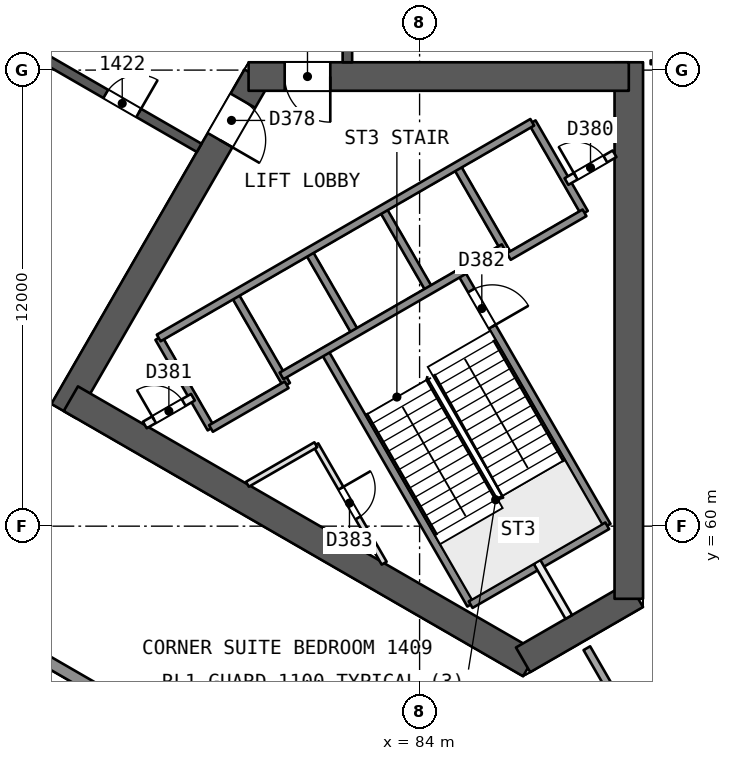
"""IFC4 building model, lengths in metres.
Left out: names, types, materials, properties, quantities, classifications, styles, units other than length and angle.
Written with IfcOpenShell. Run it as: python <this file> out.ifc"""

import sys

from ifc_helpers import new_model, si_unit, direction, frame, frame_2d, origin, place, context, subcontext, project, spatial, rectangle, extrude, element, fill, save


model = new_model("IFC4")
c1 = context("Model", 3, precision=1e-05, world=origin(), true_north=direction((0.0, 1.0)))
c2 = subcontext(c1, "Body", "Model", "MODEL_VIEW")
j1 = project(units=[si_unit("LENGTHUNIT", "METRE"), si_unit("PLANEANGLEUNIT", "RADIAN")], contexts=[c1])
p1 = place(None, origin())
s1 = spatial("IfcSite", under=j1, at=p1, CompositionType="ELEMENT")
p2 = place(p1, origin())
s2 = spatial("IfcBuilding", under=s1, at=p2, CompositionType="ELEMENT")
p3 = place(p2, frame((0.0, 0.0, 64.7)))
s3 = spatial("IfcBuildingStorey", under=s2, at=p3, CompositionType="ELEMENT", Elevation=64.7)
p4 = place(p3, frame((79.717, 71.831, 0.0), z_axis=(0.0, 0.0, 1.0), x_axis=(-0.499996230114, -0.866027580318, 0.0)))
e1 = element("IfcWall", 1, at=p4, inside=s3, PredefinedType="SHEAR", context=c2, shape_type="SweptSolid", body=[
    extrude(rectangle(XDim=10.164, YDim=0.75, at=frame_2d((5.082, 0.0))), origin(), (0.0, 0.0, 1.0), 3.7),
])
p5 = place(p4, frame((0.733, 0.0, 0.0)))
e2 = element("IfcOpeningElement", 2, at=p5, cuts=e1, PredefinedType="OPENING", context=c2, shape_type="SweptSolid", body=[
    extrude(rectangle(XDim=1.2, YDim=2.1, at=frame_2d((0.6, 1.05))), frame((0.0, 0.385, 0.0), z_axis=(0.0, -1.0, 0.0), x_axis=(1.0, 0.0, 0.0)), (0.0, 0.0, 1.0), 0.771),
])
p6 = place(p3, frame((74.822, 63.354, 0.0), z_axis=(0.0, 0.0, 1.0), x_axis=(0.8660248072, -0.500001033313, 0.0)))
e3 = element("IfcWall", 3, at=p6, inside=s3, PredefinedType="SHEAR", context=c2, shape_type="SweptSolid", body=[
    extrude(rectangle(XDim=13.958, YDim=0.75, at=frame_2d((6.979, 0.0))), origin(), (0.0, 0.0, 1.0), 3.7),
])
p7 = place(p3, frame((86.723, 56.483, 0.0), z_axis=(0.0, 0.0, 1.0), x_axis=(0.866017201164, 0.500014207086, 0.0)))
e4 = element("IfcWall", 4, at=p7, inside=s3, PredefinedType="SHEAR", context=c2, shape_type="SweptSolid", body=[
    extrude(rectangle(XDim=3.429, YDim=0.75, at=frame_2d((1.714, 0.0))), origin(), (0.0, 0.0, 1.0), 3.7),
])
p8 = place(p3, frame((89.505, 58.089, 0.0), z_axis=(0.0, 0.0, 1.0), x_axis=(0.0, 1.0, 0.0)))
e5 = element("IfcWall", 5, at=p8, inside=s3, PredefinedType="SHEAR", context=c2, shape_type="SweptSolid", body=[
    extrude(rectangle(XDim=14.117, YDim=0.75, at=frame_2d((7.059, 0.0))), origin(), (0.0, 0.0, 1.0), 3.7),
])
p9 = place(p3, frame((89.505, 71.831, 0.0), z_axis=(0.0, 0.0, 1.0), x_axis=(-1.0, 0.0, 0.0)))
e6 = element("IfcWall", 6, at=p9, inside=s3, PredefinedType="SHEAR", context=c2, shape_type="SweptSolid", body=[
    extrude(rectangle(XDim=10.005, YDim=0.75, at=frame_2d((5.002, 0.0))), origin(), (0.0, 0.0, 1.0), 3.7),
])
p10 = place(p9, frame((7.855, 0.0, 0.0)))
e7 = element("IfcOpeningElement", 7, at=p10, cuts=e6, PredefinedType="OPENING", context=c2, shape_type="SweptSolid", body=[
    extrude(rectangle(XDim=1.2, YDim=2.1, at=frame_2d((0.6, 1.05))), frame((0.0, 0.385, 0.0), z_axis=(0.0, -1.0, 0.0), x_axis=(1.0, 0.0, 0.0)), (0.0, 0.0, 1.0), 0.771),
])
p11 = place(p3, frame((82.1, 72.206, 0.0), z_axis=(0.0, 0.0, 1.0), x_axis=(0.0, 1.0, 0.0)))
e8 = element("IfcWall", 8, at=p11, inside=s3, PredefinedType="SHEAR", context=c2, shape_type="SweptSolid", body=[
    extrude(rectangle(XDim=15.588, YDim=0.25, at=frame_2d((7.794, 0.0))), origin(), (0.0, 0.0, 1.0), 3.2),
])
p12 = place(p11, frame((1.838, 0.0, 0.0)))
e9 = element("IfcOpeningElement", 9, at=p12, cuts=e8, PredefinedType="OPENING", context=c2, shape_type="SweptSolid", body=[
    extrude(rectangle(XDim=1.0, YDim=2.1, at=frame_2d((0.5, 1.05))), frame((0.0, 0.135, 0.0), z_axis=(0.0, -1.0, 0.0), x_axis=(1.0, 0.0, 0.0)), (0.0, 0.0, 1.0), 0.271),
])
p13 = place(p11, frame((9.006, 0.0, 0.0)))
e10 = element("IfcOpeningElement", 10, at=p13, cuts=e8, PredefinedType="OPENING", context=c2, shape_type="SweptSolid", body=[
    extrude(rectangle(XDim=1.1, YDim=2.1, at=frame_2d((0.55, 1.05))), frame((0.0, 0.135, 0.0), z_axis=(0.0, -1.0, 0.0), x_axis=(1.0, 0.0, 0.0)), (0.0, 0.0, 1.0), 0.271),
])
p14 = place(p11, frame((13.062, 0.0, 0.0)))
e11 = element("IfcOpeningElement", 11, at=p14, cuts=e8, PredefinedType="OPENING", context=c2, shape_type="SweptSolid", body=[
    extrude(rectangle(XDim=1.0, YDim=2.1, at=frame_2d((0.5, 1.05))), frame((0.0, 0.135, 0.0), z_axis=(0.0, -1.0, 0.0), x_axis=(1.0, 0.0, 0.0)), (0.0, 0.0, 1.0), 0.271),
])
p15 = place(p3, frame((64.7, 77.748, 0.0), z_axis=(0.0, 0.0, 1.0), x_axis=(0.866026492143, -0.499998114903, 0.0)))
e12 = element("IfcWall", 12, at=p15, inside=s3, PredefinedType="SHEAR", context=c2, shape_type="SweptSolid", body=[
    extrude(rectangle(XDim=15.588, YDim=0.25, at=frame_2d((7.794, 0.0))), origin(), (0.0, 0.0, 1.0), 3.2),
])
p16 = place(p15, frame((1.838, 0.0, 0.0)))
e13 = element("IfcOpeningElement", 13, at=p16, cuts=e12, PredefinedType="OPENING", context=c2, shape_type="SweptSolid", body=[
    extrude(rectangle(XDim=1.0, YDim=2.1, at=frame_2d((0.5, 1.05))), frame((0.0, 0.135, 0.0), z_axis=(0.0, -1.0, 0.0), x_axis=(1.0, 0.0, 0.0)), (0.0, 0.0, 1.0), 0.271),
])
p17 = place(p15, frame((8.694, 0.0, 0.0)))
e14 = element("IfcOpeningElement", 14, at=p17, cuts=e12, PredefinedType="OPENING", context=c2, shape_type="SweptSolid", body=[
    extrude(rectangle(XDim=1.1, YDim=2.1, at=frame_2d((0.55, 1.05))), frame((0.0, 0.135, 0.0), z_axis=(0.0, -1.0, 0.0), x_axis=(1.0, 0.0, 0.0)), (0.0, 0.0, 1.0), 0.271),
])
p18 = place(p15, frame((12.75, 0.0, 0.0)))
e15 = element("IfcOpeningElement", 15, at=p18, cuts=e12, PredefinedType="OPENING", context=c2, shape_type="SweptSolid", body=[
    extrude(rectangle(XDim=1.0, YDim=2.1, at=frame_2d((0.5, 1.05))), frame((0.0, 0.135, 0.0), z_axis=(0.0, -1.0, 0.0), x_axis=(1.0, 0.0, 0.0)), (0.0, 0.0, 1.0), 0.271),
])
p19 = place(p3, frame((90.079, 72.206, 0.0), z_axis=(0.0, 0.0, 1.0), x_axis=(1.0, 0.0, 0.0)))
e16 = element("IfcWall", 16, at=p19, inside=s3, PredefinedType="PARTITIONING", context=c2, shape_type="SweptSolid", body=[
    extrude(rectangle(XDim=5.571, YDim=0.1, at=frame_2d((2.786, 0.0))), origin(), (0.0, 0.0, 1.0), 3.2),
])
p20 = place(p19, frame((2.336, 0.0, 0.0)))
e17 = element("IfcOpeningElement", 17, at=p20, cuts=e16, PredefinedType="OPENING", context=c2, shape_type="SweptSolid", body=[
    extrude(rectangle(XDim=0.9, YDim=2.1, at=frame_2d((0.45, 1.05))), frame((0.0, 0.061, 0.0), z_axis=(0.0, -1.0, 0.0), x_axis=(1.0, 0.0, 0.0)), (0.0, 0.0, 1.0), 0.121),
])
p21 = place(p3, frame((88.401, 56.789, 0.0), z_axis=(0.0, 0.0, 1.0), x_axis=(0.49998471623, -0.866034227694, 0.0)))
e18 = element("IfcWall", 18, at=p21, inside=s3, PredefinedType="PARTITIONING", context=c2, shape_type="SweptSolid", body=[
    extrude(rectangle(XDim=9.347, YDim=0.2, at=frame_2d((4.674, 0.0))), origin(), (0.0, 0.0, 1.0), 3.2),
])
p22 = place(p3, frame((90.499, 47.034, 0.0), z_axis=(0.0, 0.0, 1.0), x_axis=(-0.866026049211, 0.499998882086, 0.0)))
e19 = element("IfcWall", 19, at=p22, inside=s3, PredefinedType="SOLIDWALL", context=c2, shape_type="SweptSolid", body=[
    extrude(rectangle(XDim=59.811, YDim=0.3, at=frame_2d((29.905, 0.0))), origin(), (0.0, 0.0, 1.0), 3.2),
])
p23 = place(p22, frame((28.705, 0.0, 0.0)))
e20 = element("IfcOpeningElement", 20, at=p23, cuts=e19, PredefinedType="OPENING", context=c2, shape_type="SweptSolid", body=[
    extrude(rectangle(XDim=2.4, YDim=2.4, at=frame_2d((1.2, 1.2))), frame((0.0, 0.161, 0.0), z_axis=(0.0, -1.0, 0.0), x_axis=(1.0, 0.0, 0.0)), (0.0, 0.0, 1.0), 0.321),
])
p24 = place(p22, frame((34.161, 0.0, 0.0)))
e21 = element("IfcOpeningElement", 21, at=p24, cuts=e19, PredefinedType="OPENING", context=c2, shape_type="SweptSolid", body=[
    extrude(rectangle(XDim=2.4, YDim=2.4, at=frame_2d((1.2, 1.2))), frame((0.0, 0.161, 0.0), z_axis=(0.0, -1.0, 0.0), x_axis=(1.0, 0.0, 0.0)), (0.0, 0.0, 1.0), 0.321),
])
p25 = place(p22, frame((46.394, 0.0, 0.0)))
e22 = element("IfcOpeningElement", 22, at=p25, cuts=e19, PredefinedType="OPENING", context=c2, shape_type="SweptSolid", body=[
    extrude(rectangle(XDim=2.4, YDim=2.4, at=frame_2d((1.2, 1.2))), frame((0.0, 0.161, 0.0), z_axis=(0.0, -1.0, 0.0), x_axis=(1.0, 0.0, 0.0)), (0.0, 0.0, 1.0), 0.321),
])
p26 = place(p22, frame((23.249, 0.0, 0.0)))
e23 = element("IfcOpeningElement", 23, at=p26, cuts=e19, PredefinedType="OPENING", context=c2, shape_type="SweptSolid", body=[
    extrude(rectangle(XDim=2.4, YDim=2.4, at=frame_2d((1.2, 1.2))), frame((0.0, 0.161, 0.0), z_axis=(0.0, -1.0, 0.0), x_axis=(1.0, 0.0, 0.0)), (0.0, 0.0, 1.0), 0.321),
])
p27 = place(p22, frame((11.002, 0.0, 0.0)))
e24 = element("IfcOpeningElement", 24, at=p27, cuts=e19, PredefinedType="OPENING", context=c2, shape_type="SweptSolid", body=[
    extrude(rectangle(XDim=2.4, YDim=2.4, at=frame_2d((1.2, 1.2))), frame((0.0, 0.161, 0.0), z_axis=(0.0, -1.0, 0.0), x_axis=(1.0, 0.0, 0.0)), (0.0, 0.0, 1.0), 0.321),
])
p28 = place(p3, frame((77.135, 64.952, 0.0), z_axis=(0.0, 0.0, 1.0), x_axis=(0.499996545922, -0.866027397988, 0.0)))
e25 = element("IfcWall", 25, at=p28, inside=s3, PredefinedType="SOLIDWALL", context=c2, shape_type="SweptSolid", body=[
    extrude(rectangle(XDim=2.75, YDim=0.2, at=frame_2d((1.375, 0.0))), origin(), (0.0, 0.0, 1.0), 3.2),
])
p29 = place(p3, frame((81.269, 62.142, 0.0), z_axis=(0.0, 0.0, 1.0), x_axis=(0.500043557135, -0.866000254601, 0.0)))
e26 = element("IfcWall", 26, at=p29, inside=s3, PredefinedType="PARTITIONING", context=c2, shape_type="SweptSolid", body=[
    extrude(rectangle(XDim=3.598, YDim=0.15, at=frame_2d((1.799, 0.0))), origin(), (0.0, 0.0, 1.0), 3.2),
])
p30 = place(p29, frame((1.322, 0.0, 0.0)))
e27 = element("IfcOpeningElement", 27, at=p30, cuts=e26, PredefinedType="OPENING", context=c2, shape_type="SweptSolid", body=[
    extrude(rectangle(XDim=0.9, YDim=2.1, at=frame_2d((0.45, 1.05))), frame((0.0, 0.085, 0.0), z_axis=(0.0, -1.0, 0.0), x_axis=(1.0, 0.0, 0.0)), (0.0, 0.0, 1.0), 0.171),
])
p31 = place(p3, frame((79.127, 66.102, 0.0), z_axis=(0.0, 0.0, 1.0), x_axis=(0.499996545922, -0.866027397988, 0.0)))
e28 = element("IfcWall", 28, at=p31, inside=s3, PredefinedType="SOLIDWALL", context=c2, shape_type="SweptSolid", body=[
    extrude(rectangle(XDim=2.75, YDim=0.2, at=frame_2d((1.375, 0.0))), origin(), (0.0, 0.0, 1.0), 3.2),
])
p32 = place(p3, frame((81.493, 64.604, 0.0), z_axis=(0.0, 0.0, 1.0), x_axis=(0.500006057782, -0.866021906294, 0.0)))
e29 = element("IfcWall", 29, at=p32, inside=s3, PredefinedType="SOLIDWALL", context=c2, shape_type="SweptSolid", body=[
    extrude(rectangle(XDim=7.7, YDim=0.2, at=frame_2d((3.85, 0.0))), origin(), (0.0, 0.0, 1.0), 3.2),
])
p33 = place(p3, frame((81.076, 67.227, 0.0), z_axis=(0.0, 0.0, 1.0), x_axis=(0.50000366821, -0.866023285932, 0.0)))
e30 = element("IfcWall", 30, at=p33, inside=s3, PredefinedType="SOLIDWALL", context=c2, shape_type="SweptSolid", body=[
    extrude(rectangle(XDim=2.48, YDim=0.2, at=frame_2d((1.24, 0.0))), origin(), (0.0, 0.0, 1.0), 3.2),
])
p34 = place(p3, frame((87.09, 59.06, 0.0), z_axis=(0.0, 0.0, 1.0), x_axis=(0.499937194881, -0.866061661301, 0.0)))
e31 = element("IfcWall", 31, at=p34, inside=s3, PredefinedType="PARTITIONING", context=c2, shape_type="SweptSolid", body=[
    extrude(rectangle(XDim=1.673, YDim=0.2, at=frame_2d((0.836, 0.0))), origin(), (0.0, 0.0, 1.0), 3.2),
])
p35 = place(p3, frame((83.024, 68.352, 0.0), z_axis=(0.0, 0.0, 1.0), x_axis=(0.50000366821, -0.866023285932, 0.0)))
e32 = element("IfcWall", 32, at=p35, inside=s3, PredefinedType="SOLIDWALL", context=c2, shape_type="SweptSolid", body=[
    extrude(rectangle(XDim=2.48, YDim=0.2, at=frame_2d((1.24, 0.0))), origin(), (0.0, 0.0, 1.0), 3.2),
])
p36 = place(p3, frame((85.087, 66.679, 0.0), z_axis=(0.0, 0.0, 1.0), x_axis=(0.500019787375, -0.866013979237, 0.0)))
e33 = element("IfcWall", 33, at=p36, inside=s3, PredefinedType="SOLIDWALL", context=c2, shape_type="SweptSolid", body=[
    extrude(rectangle(XDim=7.7, YDim=0.2, at=frame_2d((3.85, 0.0))), origin(), (0.0, 0.0, 1.0), 3.2),
])
p37 = place(p36, frame((0.55, 0.0, 0.0)))
e34 = element("IfcOpeningElement", 34, at=p37, cuts=e33, PredefinedType="OPENING", context=c2, shape_type="SweptSolid", body=[
    extrude(rectangle(XDim=1.1, YDim=2.1, at=frame_2d((0.55, 1.05))), frame((0.0, 0.11, 0.0), z_axis=(0.0, -1.0, 0.0), x_axis=(1.0, 0.0, 0.0)), (0.0, 0.0, 1.0), 0.221),
])
for number, where, z_axis, x_axis in (
    (35, (84.973, 69.477, 0.0), (0.0, 0.0, 1.0), (0.5, -0.866, 0.0)),
    (36, (86.965, 70.626, 0.0), (0.0, 0.0, 1.0), (0.5, -0.866, 0.0)),
):
    element("IfcWall", number, at=place(p3, frame(where, z_axis=z_axis, x_axis=x_axis)), inside=s3, PredefinedType="SOLIDWALL", context=c2, shape_type="SweptSolid", body=[
        extrude(rectangle(XDim=2.75, YDim=0.2, at=frame_2d((1.375, 0.0))), origin(), (0.0, 0.0, 1.0), 3.2),
    ])
p38 = place(p3, frame((77.135, 64.952, 0.0), z_axis=(0.0, 0.0, 1.0), x_axis=(0.866031916153, 0.499988720078, 0.0)))
e37 = element("IfcWall", 37, at=p38, inside=s3, PredefinedType="SOLIDWALL", context=c2, shape_type="SweptSolid", body=[
    extrude(rectangle(XDim=11.35, YDim=0.2, at=frame_2d((5.675, 0.0))), origin(), (0.0, 0.0, 1.0), 3.2),
])
p39 = place(p3, frame((76.77, 62.662, 0.0), z_axis=(0.0, 0.0, 1.0), x_axis=(0.866054810376, 0.49994906283, 0.0)))
e38 = element("IfcWall", 38, at=p39, inside=s3, PredefinedType="PARTITIONING", context=c2, shape_type="SweptSolid", body=[
    extrude(rectangle(XDim=1.461, YDim=0.2, at=frame_2d((0.73, 0.0))), origin(), (0.0, 0.0, 1.0), 3.2),
])
p40 = place(p39, frame((0.281, 0.0, 0.0)))
e39 = element("IfcOpeningElement", 39, at=p40, cuts=e38, PredefinedType="OPENING", context=c2, shape_type="SweptSolid", body=[
    extrude(rectangle(XDim=0.9, YDim=2.1, at=frame_2d((0.45, 1.05))), frame((0.0, 0.11, 0.0), z_axis=(0.0, -1.0, 0.0), x_axis=(1.0, 0.0, 0.0)), (0.0, 0.0, 1.0), 0.221),
])
p41 = place(p3, frame((87.865, 69.068, 0.0), z_axis=(0.0, 0.0, 1.0), x_axis=(0.865982457891, 0.500074377092, 0.0)))
e40 = element("IfcWall", 40, at=p41, inside=s3, PredefinedType="PARTITIONING", context=c2, shape_type="SweptSolid", body=[
    extrude(rectangle(XDim=1.461, YDim=0.2, at=frame_2d((0.73, 0.0))), origin(), (0.0, 0.0, 1.0), 3.2),
])
p42 = place(p41, frame((0.281, 0.0, 0.0)))
e41 = element("IfcOpeningElement", 41, at=p42, cuts=e40, PredefinedType="OPENING", context=c2, shape_type="SweptSolid", body=[
    extrude(rectangle(XDim=0.9, YDim=2.1, at=frame_2d((0.45, 1.05))), frame((0.0, 0.11, 0.0), z_axis=(0.0, -1.0, 0.0), x_axis=(1.0, 0.0, 0.0)), (0.0, 0.0, 1.0), 0.221),
])
p43 = place(p3, frame((80.367, 63.954, 0.0), z_axis=(0.0, 0.0, 1.0), x_axis=(0.866026575979, 0.499997969693, 0.0)))
e42 = element("IfcWall", 42, at=p43, inside=s3, PredefinedType="SOLIDWALL", context=c2, shape_type="SweptSolid", body=[
    extrude(rectangle(XDim=6.75, YDim=0.2, at=frame_2d((3.375, 0.0))), origin(), (0.0, 0.0, 1.0), 3.2),
])
p44 = place(p3, frame((78.51, 62.57, 0.0), z_axis=(0.0, 0.0, 1.0), x_axis=(0.866053019151, 0.499952165731, 0.0)))
e43 = element("IfcWall", 43, at=p44, inside=s3, PredefinedType="SOLIDWALL", context=c2, shape_type="SweptSolid", body=[
    extrude(rectangle(XDim=2.3, YDim=0.2, at=frame_2d((1.15, 0.0))), origin(), (0.0, 0.0, 1.0), 3.2),
])
p45 = place(p3, frame((86.348, 67.095, 0.0), z_axis=(0.0, 0.0, 1.0), x_axis=(0.86602648383, 0.499998129301, 0.0)))
e44 = element("IfcWall", 44, at=p45, inside=s3, PredefinedType="SOLIDWALL", context=c2, shape_type="SweptSolid", body=[
    extrude(rectangle(XDim=2.3, YDim=0.2, at=frame_2d((1.15, 0.0))), origin(), (0.0, 0.0, 1.0), 3.2),
])
p46 = place(p3, frame((79.47, 61.103, 0.0), z_axis=(0.0, 0.0, 1.0), x_axis=(0.866021168401, 0.500007335828, 0.0)))
e45 = element("IfcWall", 45, at=p46, inside=s3, PredefinedType="PARTITIONING", context=c2, shape_type="SweptSolid", body=[
    extrude(rectangle(XDim=2.077, YDim=0.15, at=frame_2d((1.039, 0.0))), origin(), (0.0, 0.0, 1.0), 3.2),
])
p47 = place(p3, frame((85.343, 57.935, 0.0), z_axis=(0.0, 0.0, 1.0), x_axis=(0.866004344652, 0.500036473714, 0.0)))
e46 = element("IfcWall", 46, at=p47, inside=s3, PredefinedType="SOLIDWALL", context=c2, shape_type="SweptSolid", body=[
    extrude(rectangle(XDim=4.15, YDim=0.2, at=frame_2d((2.075, 0.0))), origin(), (0.0, 0.0, 1.0), 3.2),
])
p48 = place(p18, origin())
e47 = element("IfcDoor", 47, at=p48, inside=s3, OperationType="SINGLE_SWING_RIGHT", PredefinedType="NOTDEFINED", context=c2, shape_type="SweptSolid", body=[
    extrude(rectangle(XDim=1.0, YDim=2.1, at=frame_2d((0.5, 1.05))), frame((0.0, 0.025, 0.0), z_axis=(0.0, -1.0, 0.0), x_axis=(1.0, 0.0, 0.0)), (0.0, 0.0, 1.0), 0.05),
])
fill(e15, e47)
p49 = place(p5, origin())
e48 = element("IfcDoor", 48, at=p49, inside=s3, OperationType="SINGLE_SWING_RIGHT", PredefinedType="NOTDEFINED", context=c2, shape_type="SweptSolid", body=[
    extrude(rectangle(XDim=1.2, YDim=2.1, at=frame_2d((0.6, 1.05))), frame((0.0, 0.025, 0.0), z_axis=(0.0, -1.0, 0.0), x_axis=(1.0, 0.0, 0.0)), (0.0, 0.0, 1.0), 0.05),
])
fill(e2, e48)
p50 = place(p10, origin())
e49 = element("IfcDoor", 49, at=p50, inside=s3, OperationType="SINGLE_SWING_LEFT", PredefinedType="NOTDEFINED", context=c2, shape_type="SweptSolid", body=[
    extrude(rectangle(XDim=1.2, YDim=2.1, at=frame_2d((0.6, 1.05))), frame((0.0, 0.025, 0.0), z_axis=(0.0, -1.0, 0.0), x_axis=(1.0, 0.0, 0.0)), (0.0, 0.0, 1.0), 0.05),
])
fill(e7, e49)
p51 = place(p42, origin())
e50 = element("IfcDoor", 50, at=p51, inside=s3, OperationType="SINGLE_SWING_LEFT", PredefinedType="NOTDEFINED", context=c2, shape_type="SweptSolid", body=[
    extrude(rectangle(XDim=0.9, YDim=2.1, at=frame_2d((0.45, 1.05))), frame((0.0, 0.025, 0.0), z_axis=(0.0, -1.0, 0.0), x_axis=(1.0, 0.0, 0.0)), (0.0, 0.0, 1.0), 0.05),
])
fill(e41, e50)
p52 = place(p40, origin())
e51 = element("IfcDoor", 51, at=p52, inside=s3, OperationType="SINGLE_SWING_LEFT", PredefinedType="NOTDEFINED", context=c2, shape_type="SweptSolid", body=[
    extrude(rectangle(XDim=0.9, YDim=2.1, at=frame_2d((0.45, 1.05))), frame((0.0, 0.025, 0.0), z_axis=(0.0, -1.0, 0.0), x_axis=(1.0, 0.0, 0.0)), (0.0, 0.0, 1.0), 0.05),
])
fill(e39, e51)
p53 = place(p37, origin())
e52 = element("IfcDoor", 52, at=p53, inside=s3, OperationType="SINGLE_SWING_RIGHT", PredefinedType="NOTDEFINED", context=c2, shape_type="SweptSolid", body=[
    extrude(rectangle(XDim=1.1, YDim=2.1, at=frame_2d((0.55, 1.05))), frame((0.0, 0.025, 0.0), z_axis=(0.0, -1.0, 0.0), x_axis=(1.0, 0.0, 0.0)), (0.0, 0.0, 1.0), 0.05),
])
fill(e34, e52)
p54 = place(p30, origin())
e53 = element("IfcDoor", 53, at=p54, inside=s3, OperationType="SINGLE_SWING_LEFT", PredefinedType="NOTDEFINED", context=c2, shape_type="SweptSolid", body=[
    extrude(rectangle(XDim=0.9, YDim=2.1, at=frame_2d((0.45, 1.05))), frame((0.0, 0.025, 0.0), z_axis=(0.0, -1.0, 0.0), x_axis=(1.0, 0.0, 0.0)), (0.0, 0.0, 1.0), 0.05),
])
fill(e27, e53)
save(model, sys.argv[1])
